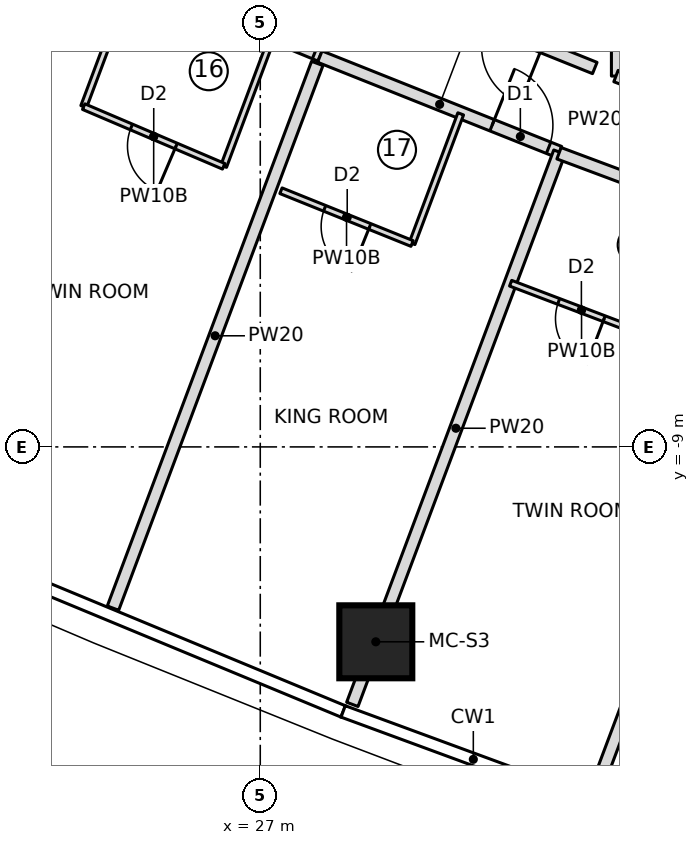
"""IFC4 building model, lengths in metres.
Left out: names, types, materials, properties, quantities, classifications, styles, units other than length and angle.
Written with IfcOpenShell. Run it as: python <this file> out.ifc"""

import sys

from ifc_helpers import new_model, si_unit, direction, frame, frame_2d, origin, origin_2d, place, context, subcontext, project, spatial, rectangle, extrude, element, fill, save


model = new_model("IFC4")
c1 = context("Model", 3, precision=1e-05, world=origin(), true_north=direction((0.0, 1.0)))
c2 = subcontext(c1, "Body", "Model", "MODEL_VIEW")
j1 = project(units=[si_unit("LENGTHUNIT", "METRE"), si_unit("PLANEANGLEUNIT", "RADIAN")], contexts=[c1])
p1 = place(None, origin())
s1 = spatial("IfcSite", under=j1, at=p1, CompositionType="ELEMENT")
p2 = place(p1, origin())
s2 = spatial("IfcBuilding", under=s1, at=p2, CompositionType="ELEMENT")
p3 = place(p2, frame((0.0, 0.0, 252.75)))
s3 = spatial("IfcBuildingStorey", under=s2, at=p3, CompositionType="ELEMENT", Elevation=252.75)
p4 = place(p3, frame((28.9, -12.205, 0.0), z_axis=(0.0, 0.0, 1.0), x_axis=(1.0, 0.0, 0.0)))
e1 = element("IfcColumn", 1, at=p4, inside=s3, PredefinedType="COLUMN", context=c2, shape_type="SweptSolid", body=[
    extrude(rectangle(XDim=1.2, YDim=1.2, at=origin_2d()), origin(), (0.0, 0.0, 1.0), 3.55),
])
p5 = place(p3, frame((26.266, -1.85, 0.0), z_axis=(0.0, 0.0, 1.0), x_axis=(0.924055156704, -0.382259162569, 0.0)))
e2 = element("IfcWall", 2, at=p5, inside=s3, PredefinedType="PARTITIONING", context=c2, shape_type="SweptSolid", body=[
    extrude(rectangle(XDim=1.862, YDim=0.2, at=frame_2d((0.931, 0.0))), origin(), (0.0, 0.0, 1.0), 3.15),
])
p6 = place(p5, frame((0.762, 0.0, 0.0)))
e3 = element("IfcOpeningElement", 3, at=p6, cuts=e2, PredefinedType="OPENING", context=c2, shape_type="SweptSolid", body=[
    extrude(rectangle(XDim=1.0, YDim=2.1, at=frame_2d((0.5, 1.05))), frame((0.0, 0.11, 0.0), z_axis=(0.0, -1.0, 0.0), x_axis=(1.0, 0.0, 0.0)), (0.0, 0.0, 1.0), 0.22),
])
p7 = place(p3, frame((24.096, -3.404, 0.0), z_axis=(0.0, 0.0, 1.0), x_axis=(0.351156192753, 0.936316895229, 0.0)))
e4 = element("IfcWall", 4, at=p7, inside=s3, PredefinedType="PARTITIONING", context=c2, shape_type="SweptSolid", body=[
    extrude(rectangle(XDim=1.634, YDim=0.1, at=frame_2d((0.817, 0.0))), origin(), (0.0, 0.0, 1.0), 3.15),
])
p8 = place(p3, frame((27.156, -2.363, 0.0), z_axis=(0.0, 0.0, 1.0), x_axis=(-0.351086267198, -0.936343117124, 0.0)))
e5 = element("IfcWall", 5, at=p8, inside=s3, PredefinedType="PARTITIONING", context=c2, shape_type="SweptSolid", body=[
    extrude(rectangle(XDim=2.159, YDim=0.1, at=frame_2d((1.08, 0.0))), origin(), (0.0, 0.0, 1.0), 3.15),
])
p9 = place(p3, frame((26.398, -4.385, 0.0), z_axis=(0.0, 0.0, 1.0), x_axis=(-0.919870178563, 0.392222965404, 0.0)))
e6 = element("IfcWall", 6, at=p9, inside=s3, PredefinedType="PARTITIONING", context=c2, shape_type="SweptSolid", body=[
    extrude(rectangle(XDim=2.502, YDim=0.1, at=frame_2d((1.251, 0.0))), origin(), (0.0, 0.0, 1.0), 3.15),
])
p10 = place(p9, frame((0.85, 0.0, 0.0)))
e7 = element("IfcOpeningElement", 7, at=p10, cuts=e6, PredefinedType="OPENING", context=c2, shape_type="SweptSolid", body=[
    extrude(rectangle(XDim=0.8, YDim=2.1, at=frame_2d((0.4, 1.05))), frame((0.0, 0.06, 0.0), z_axis=(0.0, -1.0, 0.0), x_axis=(1.0, 0.0, 0.0)), (0.0, 0.0, 1.0), 0.12),
])
p11 = place(p3, frame((24.578, -11.652, 0.0), z_axis=(0.0, 0.0, 1.0), x_axis=(0.351140219871, 0.936322885542, 0.0)))
e8 = element("IfcWall", 8, at=p11, inside=s3, PredefinedType="PARTITIONING", context=c2, shape_type="SweptSolid", body=[
    extrude(rectangle(XDim=9.568, YDim=0.2, at=frame_2d((4.784, 0.0))), origin(), (0.0, 0.0, 1.0), 3.15),
])
p12 = place(p3, frame((27.98, -2.581, 0.0), z_axis=(0.0, 0.0, 1.0), x_axis=(0.928920552813, -0.370279092795, 0.0)))
e9 = element("IfcWall", 9, at=p12, inside=s3, PredefinedType="PARTITIONING", context=c2, shape_type="SweptSolid", body=[
    extrude(rectangle(XDim=4.242, YDim=0.2, at=frame_2d((2.121, 0.0))), origin(), (0.0, 0.0, 1.0), 3.15),
])
p13 = place(p12, frame((3.05, 0.0, 0.0)))
e10 = element("IfcOpeningElement", 10, at=p13, cuts=e9, PredefinedType="OPENING", context=c2, shape_type="SweptSolid", body=[
    extrude(rectangle(XDim=1.0, YDim=2.1, at=frame_2d((0.5, 1.05))), frame((0.0, 0.11, 0.0), z_axis=(0.0, -1.0, 0.0), x_axis=(1.0, 0.0, 0.0)), (0.0, 0.0, 1.0), 0.22),
])
p14 = place(p3, frame((30.296, -3.522, 0.0), z_axis=(0.0, 0.0, 1.0), x_axis=(-0.351099944253, -0.936337988734, 0.0)))
e11 = element("IfcWall", 11, at=p14, inside=s3, PredefinedType="PARTITIONING", context=c2, shape_type="SweptSolid", body=[
    extrude(rectangle(XDim=2.277, YDim=0.1, at=frame_2d((1.139, 0.0))), origin(), (0.0, 0.0, 1.0), 3.15),
])
p15 = place(p3, frame((29.497, -5.655, 0.0), z_axis=(0.0, 0.0, 1.0), x_axis=(-0.927619412923, 0.373526739028, 0.0)))
e12 = element("IfcWall", 12, at=p15, inside=s3, PredefinedType="PARTITIONING", context=c2, shape_type="SweptSolid", body=[
    extrude(rectangle(XDim=2.324, YDim=0.1, at=frame_2d((1.162, 0.0))), origin(), (0.0, 0.0, 1.0), 3.15),
])
p16 = place(p15, frame((0.75, 0.0, 0.0)))
e13 = element("IfcOpeningElement", 13, at=p16, cuts=e12, PredefinedType="OPENING", context=c2, shape_type="SweptSolid", body=[
    extrude(rectangle(XDim=0.8, YDim=2.1, at=frame_2d((0.4, 1.05))), frame((0.0, 0.06, 0.0), z_axis=(0.0, -1.0, 0.0), x_axis=(1.0, 0.0, 0.0)), (0.0, 0.0, 1.0), 0.12),
])
p17 = place(p3, frame((28.514, -13.235, 0.0), z_axis=(0.0, 0.0, 1.0), x_axis=(0.351126199585, 0.936328143316, 0.0)))
e14 = element("IfcWall", 14, at=p17, inside=s3, PredefinedType="PARTITIONING", context=c2, shape_type="SweptSolid", body=[
    extrude(rectangle(XDim=9.701, YDim=0.2, at=frame_2d((4.851, 0.0))), origin(), (0.0, 0.0, 1.0), 3.15),
])
p18 = place(p3, frame((31.913, -4.17, 0.0), z_axis=(0.0, 0.0, 1.0), x_axis=(0.936848300955, -0.349735987565, 0.0)))
e15 = element("IfcWall", 15, at=p18, inside=s3, PredefinedType="PARTITIONING", context=c2, shape_type="SweptSolid", body=[
    extrude(rectangle(XDim=4.244, YDim=0.2, at=frame_2d((2.122, 0.0))), origin(), (0.0, 0.0, 1.0), 3.15),
])
p19 = place(p18, frame((3.05, 0.0, 0.0)))
e16 = element("IfcOpeningElement", 16, at=p19, cuts=e15, PredefinedType="OPENING", context=c2, shape_type="SweptSolid", body=[
    extrude(rectangle(XDim=1.0, YDim=2.1, at=frame_2d((0.5, 1.05))), frame((0.0, 0.11, 0.0), z_axis=(0.0, -1.0, 0.0), x_axis=(1.0, 0.0, 0.0)), (0.0, 0.0, 1.0), 0.22),
])
p20 = place(p3, frame((33.45, -7.193, 0.0), z_axis=(0.0, 0.0, 1.0), x_axis=(-0.93495051617, 0.354778145202, 0.0)))
e17 = element("IfcWall", 17, at=p20, inside=s3, PredefinedType="PARTITIONING", context=c2, shape_type="SweptSolid", body=[
    extrude(rectangle(XDim=2.495, YDim=0.1, at=frame_2d((1.247, 0.0))), origin(), (0.0, 0.0, 1.0), 3.15),
])
p21 = place(p20, frame((0.85, 0.0, 0.0)))
e18 = element("IfcOpeningElement", 18, at=p21, cuts=e17, PredefinedType="OPENING", context=c2, shape_type="SweptSolid", body=[
    extrude(rectangle(XDim=0.8, YDim=2.1, at=frame_2d((0.4, 1.05))), frame((0.0, 0.06, 0.0), z_axis=(0.0, -1.0, 0.0), x_axis=(1.0, 0.0, 0.0)), (0.0, 0.0, 1.0), 0.12),
])
p22 = place(p3, frame((32.483, -14.738, 0.0), z_axis=(0.0, 0.0, 1.0), x_axis=(0.351117925717, 0.936331246002, 0.0)))
e19 = element("IfcWall", 19, at=p22, inside=s3, PredefinedType="PARTITIONING", context=c2, shape_type="SweptSolid", body=[
    extrude(rectangle(XDim=9.701, YDim=0.2, at=frame_2d((4.851, 0.0))), origin(), (0.0, 0.0, 1.0), 3.15),
])
p23 = place(p3, frame((32.501, -2.768, 0.0), z_axis=(0.0, 0.0, 1.0), x_axis=(-0.927620073141, 0.373525099433, 0.0)))
e20 = element("IfcWall", 20, at=p23, inside=s3, PredefinedType="PARTITIONING", context=c2, shape_type="SweptSolid", body=[
    extrude(rectangle(XDim=2.858, YDim=0.2, at=frame_2d((1.429, 0.0))), origin(), (0.0, 0.0, 1.0), 3.15),
])
p24 = place(p23, frame((0.929, 0.0, 0.0)))
e21 = element("IfcOpeningElement", 21, at=p24, cuts=e20, PredefinedType="OPENING", context=c2, shape_type="SweptSolid", body=[
    extrude(rectangle(XDim=1.0, YDim=2.1, at=frame_2d((0.5, 1.05))), frame((0.0, 0.11, 0.0), z_axis=(0.0, -1.0, 0.0), x_axis=(1.0, 0.0, 0.0)), (0.0, 0.0, 1.0), 0.22),
])
p25 = place(p3, frame((32.85, -2.901, 0.0), z_axis=(0.0, 0.0, 1.0), x_axis=(0.0, 1.0, 0.0)))
e22 = element("IfcWall", 22, at=p25, inside=s3, PredefinedType="PARTITIONING", context=c2, shape_type="SweptSolid", body=[
    extrude(rectangle(XDim=5.801, YDim=0.15, at=frame_2d((2.901, 0.0))), origin(), (0.0, 0.0, 1.0), 3.15),
])
p26 = place(p3, frame((36.236, -4.186, 0.0), z_axis=(0.0, 0.0, 1.0), x_axis=(-0.934953584606, 0.354770058816, 0.0)))
e23 = element("IfcWall", 23, at=p26, inside=s3, PredefinedType="PARTITIONING", context=c2, shape_type="SweptSolid", body=[
    extrude(rectangle(XDim=3.622, YDim=0.2, at=frame_2d((1.811, 0.0))), origin(), (0.0, 0.0, 1.0), 3.15),
])
p27 = place(p10, origin())
e24 = element("IfcDoor", 24, at=p27, inside=s3, OperationType="SINGLE_SWING_LEFT", PredefinedType="DOOR", context=c2, shape_type="SweptSolid", body=[
    extrude(rectangle(XDim=0.8, YDim=2.1, at=frame_2d((0.4, 1.05))), frame((0.0, 0.025, 0.0), z_axis=(0.0, -1.0, 0.0), x_axis=(1.0, 0.0, 0.0)), (0.0, 0.0, 1.0), 0.05),
])
fill(e7, e24)
p28 = place(p6, origin())
e25 = element("IfcDoor", 25, at=p28, inside=s3, OperationType="SINGLE_SWING_LEFT", PredefinedType="DOOR", context=c2, shape_type="SweptSolid", body=[
    extrude(rectangle(XDim=1.0, YDim=2.1, at=frame_2d((0.5, 1.05))), frame((0.0, 0.025, 0.0), z_axis=(0.0, -1.0, 0.0), x_axis=(1.0, 0.0, 0.0)), (0.0, 0.0, 1.0), 0.05),
])
fill(e3, e25)
p29 = place(p16, origin())
e26 = element("IfcDoor", 26, at=p29, inside=s3, OperationType="SINGLE_SWING_LEFT", PredefinedType="DOOR", context=c2, shape_type="SweptSolid", body=[
    extrude(rectangle(XDim=0.8, YDim=2.1, at=frame_2d((0.4, 1.05))), frame((0.0, 0.025, 0.0), z_axis=(0.0, -1.0, 0.0), x_axis=(1.0, 0.0, 0.0)), (0.0, 0.0, 1.0), 0.05),
])
fill(e13, e26)
p30 = place(p13, origin())
e27 = element("IfcDoor", 27, at=p30, inside=s3, OperationType="SINGLE_SWING_LEFT", PredefinedType="DOOR", context=c2, shape_type="SweptSolid", body=[
    extrude(rectangle(XDim=1.0, YDim=2.1, at=frame_2d((0.5, 1.05))), frame((0.0, 0.025, 0.0), z_axis=(0.0, -1.0, 0.0), x_axis=(1.0, 0.0, 0.0)), (0.0, 0.0, 1.0), 0.05),
])
fill(e10, e27)
p31 = place(p21, origin())
e28 = element("IfcDoor", 28, at=p31, inside=s3, OperationType="SINGLE_SWING_LEFT", PredefinedType="DOOR", context=c2, shape_type="SweptSolid", body=[
    extrude(rectangle(XDim=0.8, YDim=2.1, at=frame_2d((0.4, 1.05))), frame((0.0, 0.025, 0.0), z_axis=(0.0, -1.0, 0.0), x_axis=(1.0, 0.0, 0.0)), (0.0, 0.0, 1.0), 0.05),
])
fill(e18, e28)
save(model, sys.argv[1])
